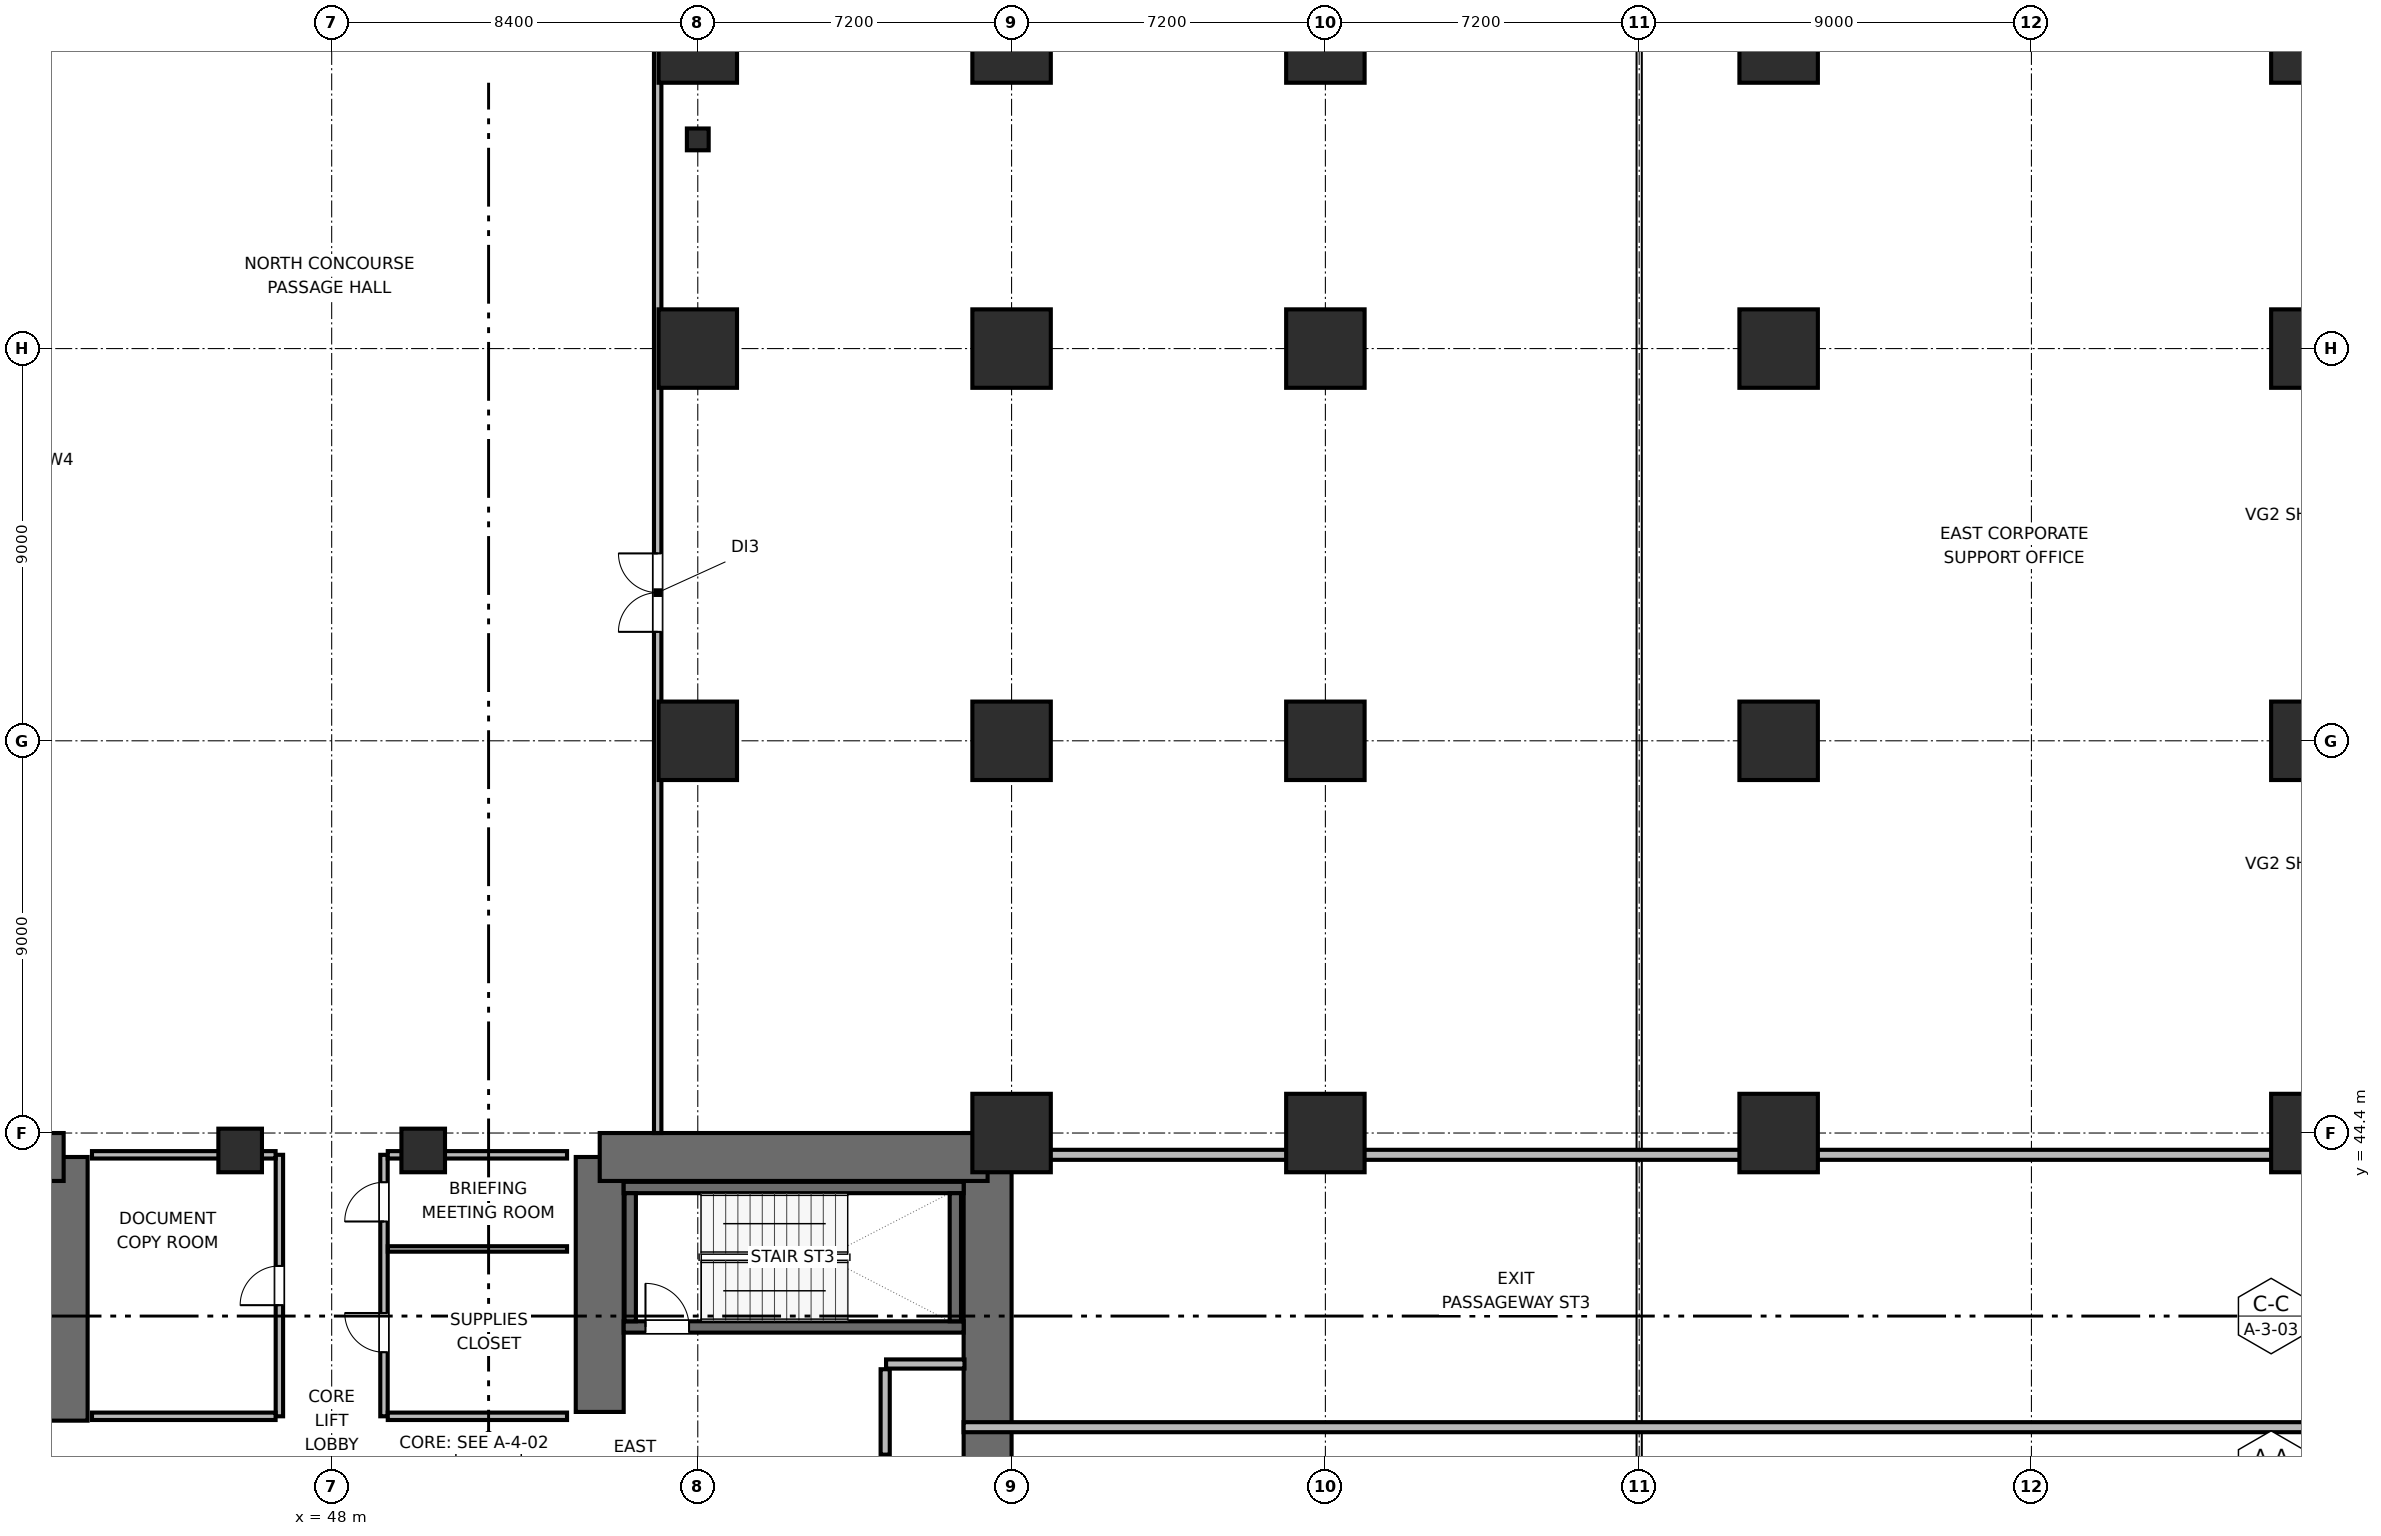
"""IFC4 building model, lengths in metres.
Left out: names, types, materials, properties, quantities, classifications, styles, units other than length and angle.
Written with IfcOpenShell. Run it as: python <this file> out.ifc"""

import sys

from ifc_helpers import new_model, si_unit, direction, frame, frame_2d, origin, origin_2d, place, context, subcontext, project, spatial, rectangle, hollow_rectangle, extrude, element, fill, save


model = new_model("IFC4")
c1 = context("Model", 3, precision=1e-05, world=origin(), true_north=direction((0.0, 1.0)))
c2 = subcontext(c1, "Body", "Model", "MODEL_VIEW")
j1 = project(units=[si_unit("LENGTHUNIT", "METRE"), si_unit("PLANEANGLEUNIT", "RADIAN")], contexts=[c1])
p1 = place(None, origin())
s1 = spatial("IfcSite", under=j1, at=p1, CompositionType="ELEMENT")
p2 = place(p1, origin())
s2 = spatial("IfcBuilding", under=s1, at=p2, CompositionType="ELEMENT")
p3 = place(p2, origin())
s3 = spatial("IfcBuildingStorey", under=s2, at=p3, CompositionType="ELEMENT", Elevation=0.0)
p4 = place(p3, frame((41.85, 37.8, 0.0), z_axis=(0.0, 0.0, 1.0), x_axis=(0.0, 1.0, 0.0)))
e1 = element("IfcWall", 1, at=p4, inside=s3, PredefinedType="SHEAR", context=c2, shape_type="SweptSolid", body=[
    extrude(rectangle(XDim=6.05, YDim=1.1, at=frame_2d((3.025, 0.0))), origin(), (0.0, 0.0, 1.0), 4.5),
])
p5 = place(p3, frame((32.95, 43.85, 0.0), z_axis=(0.0, 0.0, 1.0), x_axis=(1.0, 0.0, 0.0)))
e2 = element("IfcWall", 2, at=p5, inside=s3, PredefinedType="SHEAR", context=c2, shape_type="SweptSolid", body=[
    extrude(rectangle(XDim=8.9, YDim=1.1, at=frame_2d((4.45, 0.0))), origin(), (0.0, 0.0, 1.0), 4.5),
])
p6 = place(p5, frame((0.9, 0.0, 0.0)))
e3 = element("IfcOpeningElement", 3, at=p6, cuts=e2, PredefinedType="OPENING", context=c2, shape_type="SweptSolid", body=[
    extrude(rectangle(XDim=0.95, YDim=2.04, at=frame_2d((0.475, 1.02))), frame((0.0, 0.56, 0.0), z_axis=(0.0, -1.0, 0.0), x_axis=(1.0, 0.0, 0.0)), (0.0, 0.0, 1.0), 1.12),
])
p7 = place(p5, frame((4.15, 0.0, 0.0)))
e4 = element("IfcOpeningElement", 4, at=p7, cuts=e2, PredefinedType="OPENING", context=c2, shape_type="SweptSolid", body=[
    extrude(rectangle(XDim=0.9, YDim=2.02, at=frame_2d((0.45, 1.01))), frame((0.0, 0.56, 0.0), z_axis=(0.0, -1.0, 0.0), x_axis=(1.0, 0.0, 0.0)), (0.0, 0.0, 1.0), 1.12),
])
p8 = place(p5, frame((7.05, 0.0, 0.0)))
e5 = element("IfcOpeningElement", 5, at=p8, cuts=e2, PredefinedType="OPENING", context=c2, shape_type="SweptSolid", body=[
    extrude(rectangle(XDim=0.9, YDim=2.02, at=frame_2d((0.45, 1.01))), frame((0.0, 0.56, 0.0), z_axis=(0.0, -1.0, 0.0), x_axis=(1.0, 0.0, 0.0)), (0.0, 0.0, 1.0), 1.12),
])
p9 = place(p3, frame((54.15, 38.0, 0.0), z_axis=(0.0, 0.0, 1.0), x_axis=(0.0, 1.0, 0.0)))
e6 = element("IfcWall", 6, at=p9, inside=s3, PredefinedType="SHEAR", context=c2, shape_type="SweptSolid", body=[
    extrude(rectangle(XDim=5.85, YDim=1.1, at=frame_2d((2.925, 0.0))), origin(), (0.0, 0.0, 1.0), 4.5),
])
p10 = place(p3, frame((63.05, 27.6, 0.0), z_axis=(0.0, 0.0, 1.0), x_axis=(0.0, 1.0, 0.0)))
e7 = element("IfcWall", 7, at=p10, inside=s3, PredefinedType="SHEAR", context=c2, shape_type="SweptSolid", body=[
    extrude(rectangle(XDim=16.8, YDim=1.1, at=frame_2d((8.4, 0.0))), origin(), (0.0, 0.0, 1.0), 4.5),
])
p11 = place(p3, frame((54.15, 43.85, 0.0), z_axis=(0.0, 0.0, 1.0), x_axis=(1.0, 0.0, 0.0)))
e8 = element("IfcWall", 8, at=p11, inside=s3, PredefinedType="SHEAR", context=c2, shape_type="SweptSolid", body=[
    extrude(rectangle(XDim=8.9, YDim=1.1, at=frame_2d((4.45, 0.0))), origin(), (0.0, 0.0, 1.0), 4.5),
])
p12 = place(p3, frame((54.7, 39.95, 0.0), z_axis=(0.0, 0.0, 1.0), x_axis=(1.0, 0.0, 0.0)))
e9 = element("IfcWall", 9, at=p12, inside=s3, PredefinedType="SHEAR", context=c2, shape_type="SweptSolid", body=[
    extrude(rectangle(XDim=7.8, YDim=0.26, at=frame_2d((3.9, 0.0))), origin(), (0.0, 0.0, 1.0), 4.5),
])
p13 = place(p12, frame((0.5, 0.0, 0.0)))
e10 = element("IfcOpeningElement", 10, at=p13, cuts=e9, PredefinedType="OPENING", context=c2, shape_type="SweptSolid", body=[
    extrude(rectangle(XDim=1.0, YDim=2.04, at=frame_2d((0.5, 1.02))), frame((0.0, 0.14, 0.0), z_axis=(0.0, -1.0, 0.0), x_axis=(1.0, 0.0, 0.0)), (0.0, 0.0, 1.0), 0.28),
])
p14 = place(p3, frame((54.7, 43.15, 0.0), z_axis=(0.0, 0.0, 1.0), x_axis=(1.0, 0.0, 0.0)))
e11 = element("IfcWall", 11, at=p14, inside=s3, PredefinedType="SHEAR", context=c2, shape_type="SweptSolid", body=[
    extrude(rectangle(XDim=7.8, YDim=0.26, at=frame_2d((3.9, 0.0))), origin(), (0.0, 0.0, 1.0), 4.5),
])
for number, where, z_axis, x_axis in (
    (12, (54.85, 40.08, 0.0), (0.0, 0.0, 1.0), (0.0, 1.0, 0.0)),
    (13, (62.31, 40.08, 0.0), (0.0, 0.0, 1.0), (0.0, 1.0, 0.0)),
):
    element("IfcWall", number, at=place(p3, frame(where, z_axis=z_axis, x_axis=x_axis)), inside=s3, PredefinedType="SHEAR", context=c2, shape_type="SweptSolid", body=[
        extrude(rectangle(XDim=2.94, YDim=0.26, at=frame_2d((1.47, 0.0))), origin(), (0.0, 0.0, 1.0), 4.5),
    ])
for number, where, z_axis, x_axis in (
    (14, (56.4, 53.4, 0.0), (0.0, 0.0, 1.0), (1.0, 0.0, 0.0)),
    (15, (56.4, 62.4, 0.0), (0.0, 0.0, 1.0), (1.0, 0.0, 0.0)),
    (16, (56.4, 69.4, 0.0), (0.0, 0.0, 1.0), (1.0, 0.0, 0.0)),
    (17, (63.6, 44.4, 0.0), (0.0, 0.0, 1.0), (1.0, 0.0, 0.0)),
    (18, (63.6, 53.4, 0.0), (0.0, 0.0, 1.0), (1.0, 0.0, 0.0)),
    (19, (63.6, 62.4, 0.0), (0.0, 0.0, 1.0), (1.0, 0.0, 0.0)),
    (20, (63.6, 69.4, 0.0), (0.0, 0.0, 1.0), (1.0, 0.0, 0.0)),
    (21, (70.8, 44.4, 0.0), (0.0, 0.0, 1.0), (1.0, 0.0, 0.0)),
    (22, (70.8, 53.4, 0.0), (0.0, 0.0, 1.0), (1.0, 0.0, 0.0)),
    (23, (70.8, 62.4, 0.0), (0.0, 0.0, 1.0), (1.0, 0.0, 0.0)),
    (24, (70.8, 69.4, 0.0), (0.0, 0.0, 1.0), (1.0, 0.0, 0.0)),
    (25, (81.2, 44.4, 0.0), (0.0, 0.0, 1.0), (1.0, 0.0, 0.0)),
    (26, (81.2, 53.4, 0.0), (0.0, 0.0, 1.0), (1.0, 0.0, 0.0)),
    (27, (81.2, 62.4, 0.0), (0.0, 0.0, 1.0), (1.0, 0.0, 0.0)),
    (28, (81.2, 69.4, 0.0), (0.0, 0.0, 1.0), (1.0, 0.0, 0.0)),
    (29, (93.4, 44.4, 0.0), (0.0, 0.0, 1.0), (1.0, 0.0, 0.0)),
    (30, (93.4, 53.4, 0.0), (0.0, 0.0, 1.0), (1.0, 0.0, 0.0)),
    (31, (93.4, 62.4, 0.0), (0.0, 0.0, 1.0), (1.0, 0.0, 0.0)),
    (32, (93.4, 69.4, 0.0), (0.0, 0.0, 1.0), (1.0, 0.0, 0.0)),
):
    element("IfcColumn", number, at=place(p3, frame(where, z_axis=z_axis, x_axis=x_axis)), inside=s3, PredefinedType="COLUMN", context=c2, shape_type="SweptSolid", body=[
        extrude(rectangle(XDim=1.8, YDim=1.8, at=origin_2d()), origin(), (0.0, 0.0, 1.0), 4.5),
    ])
for number, where, z_axis, x_axis in (
    (33, (45.9, 44.0, 0.0), (0.0, 0.0, 1.0), (1.0, 0.0, 0.0)),
    (34, (50.1, 44.0, 0.0), (0.0, 0.0, 1.0), (1.0, 0.0, 0.0)),
):
    element("IfcColumn", number, at=place(p3, frame(where, z_axis=z_axis, x_axis=x_axis)), inside=s3, PredefinedType="COLUMN", context=c2, shape_type="SweptSolid", body=[
        extrude(rectangle(XDim=1.0, YDim=1.0, at=origin_2d()), origin(), (0.0, 0.0, 1.0), 4.5),
    ])
p15 = place(p3, frame((56.4, 67.2, 0.0), z_axis=(0.0, 0.0, 1.0), x_axis=(1.0, 0.0, 0.0)))
e35 = element("IfcColumn", 35, at=p15, inside=s3, PredefinedType="PILASTER", context=c2, shape_type="SweptSolid", body=[
    extrude(hollow_rectangle(XDim=0.5, YDim=0.5, WallThickness=0.025, at=origin_2d()), origin(), (0.0, 0.0, 1.0), 4.18),
])
p16 = place(p3, frame((60.72, 39.1, 0.0), z_axis=(0.0, 0.0, 1.0), x_axis=(1.0, 0.0, 0.0)))
e36 = element("IfcWall", 36, at=p16, inside=s3, PredefinedType="PARTITIONING", context=c2, shape_type="SweptSolid", body=[
    extrude(rectangle(XDim=1.8, YDim=0.21, at=frame_2d((0.9, 0.0))), origin(), (0.0, 0.0, 1.0), 4.18),
])
p17 = place(p3, frame((60.7, 37.02, 0.0), z_axis=(0.0, 0.0, 1.0), x_axis=(0.0, 1.0, 0.0)))
e37 = element("IfcWall", 37, at=p17, inside=s3, PredefinedType="PARTITIONING", context=c2, shape_type="SweptSolid", body=[
    extrude(rectangle(XDim=1.96, YDim=0.21, at=frame_2d((0.98, 0.0))), origin(), (0.0, 0.0, 1.0), 4.18),
])
p18 = place(p3, frame((62.5, 37.65, 0.0), z_axis=(0.0, 0.0, 1.0), x_axis=(1.0, 0.0, 0.0)))
e38 = element("IfcWall", 38, at=p18, inside=s3, PredefinedType="PARTITIONING", context=c2, shape_type="SweptSolid", body=[
    extrude(rectangle(XDim=33.135, YDim=0.23, at=frame_2d((16.567, 0.0))), origin(), (0.0, 0.0, 1.0), 4.18),
])
p19 = place(p3, frame((63.05, 43.9, 0.0), z_axis=(0.0, 0.0, 1.0), x_axis=(1.0, 0.0, 0.0)))
e39 = element("IfcWall", 39, at=p19, inside=s3, PredefinedType="PARTITIONING", context=c2, shape_type="SweptSolid", body=[
    extrude(rectangle(XDim=32.585, YDim=0.23, at=frame_2d((16.292, 0.0))), origin(), (0.0, 0.0, 1.0), 4.18),
])
p20 = place(p3, frame((46.8, 37.9, 0.0), z_axis=(0.0, 0.0, 1.0), x_axis=(0.0, 1.0, 0.0)))
e40 = element("IfcWall", 40, at=p20, inside=s3, PredefinedType="PARTITIONING", context=c2, shape_type="SweptSolid", body=[
    extrude(rectangle(XDim=6.0, YDim=0.17, at=frame_2d((3.0, 0.0))), origin(), (0.0, 0.0, 1.0), 4.18),
])
p21 = place(p20, frame((2.55, 0.0, 0.0)))
e41 = element("IfcOpeningElement", 41, at=p21, cuts=e40, PredefinedType="OPENING", context=c2, shape_type="SweptSolid", body=[
    extrude(rectangle(XDim=0.9, YDim=2.02, at=frame_2d((0.45, 1.01))), frame((0.0, 0.095, 0.0), z_axis=(0.0, -1.0, 0.0), x_axis=(1.0, 0.0, 0.0)), (0.0, 0.0, 1.0), 0.19),
])
p22 = place(p3, frame((42.5, 37.9, 0.0), z_axis=(0.0, 0.0, 1.0), x_axis=(1.0, 0.0, 0.0)))
e42 = element("IfcWall", 42, at=p22, inside=s3, PredefinedType="PARTITIONING", context=c2, shape_type="SweptSolid", body=[
    extrude(rectangle(XDim=4.213, YDim=0.17, at=frame_2d((2.106, 0.0))), origin(), (0.0, 0.0, 1.0), 4.18),
])
p23 = place(p3, frame((42.5, 43.9, 0.0), z_axis=(0.0, 0.0, 1.0), x_axis=(1.0, 0.0, 0.0)))
e43 = element("IfcWall", 43, at=p23, inside=s3, PredefinedType="PARTITIONING", context=c2, shape_type="SweptSolid", body=[
    extrude(rectangle(XDim=4.213, YDim=0.17, at=frame_2d((2.106, 0.0))), origin(), (0.0, 0.0, 1.0), 3.065),
])
p24 = place(p3, frame((49.2, 37.9, 0.0), z_axis=(0.0, 0.0, 1.0), x_axis=(0.0, 1.0, 0.0)))
e44 = element("IfcWall", 44, at=p24, inside=s3, PredefinedType="PARTITIONING", context=c2, shape_type="SweptSolid", body=[
    extrude(rectangle(XDim=6.0, YDim=0.17, at=frame_2d((3.0, 0.0))), origin(), (0.0, 0.0, 1.0), 4.18),
])
p25 = place(p24, frame((1.47, 0.0, 0.0)))
e45 = element("IfcOpeningElement", 45, at=p25, cuts=e44, PredefinedType="OPENING", context=c2, shape_type="SweptSolid", body=[
    extrude(rectangle(XDim=0.9, YDim=2.02, at=frame_2d((0.45, 1.01))), frame((0.0, 0.095, 0.0), z_axis=(0.0, -1.0, 0.0), x_axis=(1.0, 0.0, 0.0)), (0.0, 0.0, 1.0), 0.19),
])
p26 = place(p24, frame((4.47, 0.0, 0.0)))
e46 = element("IfcOpeningElement", 46, at=p26, cuts=e44, PredefinedType="OPENING", context=c2, shape_type="SweptSolid", body=[
    extrude(rectangle(XDim=0.9, YDim=2.02, at=frame_2d((0.45, 1.01))), frame((0.0, 0.095, 0.0), z_axis=(0.0, -1.0, 0.0), x_axis=(1.0, 0.0, 0.0)), (0.0, 0.0, 1.0), 0.19),
])
p27 = place(p3, frame((49.287, 37.9, 0.0), z_axis=(0.0, 0.0, 1.0), x_axis=(1.0, 0.0, 0.0)))
e47 = element("IfcWall", 47, at=p27, inside=s3, PredefinedType="PARTITIONING", context=c2, shape_type="SweptSolid", body=[
    extrude(rectangle(XDim=4.113, YDim=0.17, at=frame_2d((2.056, 0.0))), origin(), (0.0, 0.0, 1.0), 4.18),
])
p28 = place(p3, frame((49.287, 43.9, 0.0), z_axis=(0.0, 0.0, 1.0), x_axis=(1.0, 0.0, 0.0)))
e48 = element("IfcWall", 48, at=p28, inside=s3, PredefinedType="PARTITIONING", context=c2, shape_type="SweptSolid", body=[
    extrude(rectangle(XDim=4.113, YDim=0.17, at=frame_2d((2.056, 0.0))), origin(), (0.0, 0.0, 1.0), 3.065),
])
p29 = place(p3, frame((49.287, 41.74, 0.0), z_axis=(0.0, 0.0, 1.0), x_axis=(1.0, 0.0, 0.0)))
e49 = element("IfcWall", 49, at=p29, inside=s3, PredefinedType="PARTITIONING", context=c2, shape_type="SweptSolid", body=[
    extrude(rectangle(XDim=4.113, YDim=0.125, at=frame_2d((2.056, 0.0))), origin(), (0.0, 0.0, 1.0), 4.18),
])
p30 = place(p3, frame((55.48, 44.4, 0.0), z_axis=(0.0, 0.0, 1.0), x_axis=(0.0, 1.0, 0.0)))
e50 = element("IfcWall", 50, at=p30, inside=s3, PredefinedType="PARTITIONING", context=c2, shape_type="SweptSolid", body=[
    extrude(rectangle(XDim=27.315, YDim=0.17, at=frame_2d((13.658, 0.0))), origin(), (0.0, 0.0, 1.0), 4.18),
])
p31 = place(p30, frame((11.5, 0.0, 0.0)))
e51 = element("IfcOpeningElement", 51, at=p31, cuts=e50, PredefinedType="OPENING", context=c2, shape_type="SweptSolid", body=[
    extrude(rectangle(XDim=1.8, YDim=2.06, at=frame_2d((0.9, 1.03))), frame((0.0, 0.095, 0.0), z_axis=(0.0, -1.0, 0.0), x_axis=(1.0, 0.0, 0.0)), (0.0, 0.0, 1.0), 0.19),
])
p32 = place(p13, origin())
e52 = element("IfcDoor", 52, at=p32, inside=s3, OperationType="SINGLE_SWING_LEFT", PredefinedType="DOOR", context=c2, shape_type="SweptSolid", body=[
    extrude(rectangle(XDim=1.0, YDim=2.04, at=frame_2d((0.5, 1.02))), frame((0.0, 0.025, 0.0), z_axis=(0.0, -1.0, 0.0), x_axis=(1.0, 0.0, 0.0)), (0.0, 0.0, 1.0), 0.05),
])
fill(e10, e52)
p33 = place(p21, origin())
e53 = element("IfcDoor", 53, at=p33, inside=s3, OperationType="SINGLE_SWING_LEFT", PredefinedType="DOOR", context=c2, shape_type="SweptSolid", body=[
    extrude(rectangle(XDim=0.9, YDim=2.02, at=frame_2d((0.45, 1.01))), frame((0.0, 0.025, 0.0), z_axis=(0.0, -1.0, 0.0), x_axis=(1.0, 0.0, 0.0)), (0.0, 0.0, 1.0), 0.05),
])
fill(e41, e53)
p34 = place(p25, origin())
e54 = element("IfcDoor", 54, at=p34, inside=s3, OperationType="SINGLE_SWING_RIGHT", PredefinedType="DOOR", context=c2, shape_type="SweptSolid", body=[
    extrude(rectangle(XDim=0.9, YDim=2.02, at=frame_2d((0.45, 1.01))), frame((0.0, 0.025, 0.0), z_axis=(0.0, -1.0, 0.0), x_axis=(1.0, 0.0, 0.0)), (0.0, 0.0, 1.0), 0.05),
])
fill(e45, e54)
p35 = place(p26, origin())
e55 = element("IfcDoor", 55, at=p35, inside=s3, OperationType="SINGLE_SWING_LEFT", PredefinedType="DOOR", context=c2, shape_type="SweptSolid", body=[
    extrude(rectangle(XDim=0.9, YDim=2.02, at=frame_2d((0.45, 1.01))), frame((0.0, 0.025, 0.0), z_axis=(0.0, -1.0, 0.0), x_axis=(1.0, 0.0, 0.0)), (0.0, 0.0, 1.0), 0.05),
])
fill(e46, e55)
p36 = place(p31, origin())
e56 = element("IfcDoor", 56, at=p36, inside=s3, OperationType="DOUBLE_DOOR_SINGLE_SWING", PredefinedType="DOOR", context=c2, shape_type="SweptSolid", body=[
    extrude(rectangle(XDim=1.8, YDim=2.06, at=frame_2d((0.9, 1.03))), frame((0.0, 0.025, 0.0), z_axis=(0.0, -1.0, 0.0), x_axis=(1.0, 0.0, 0.0)), (0.0, 0.0, 1.0), 0.05),
])
fill(e51, e56)
save(model, sys.argv[1])
